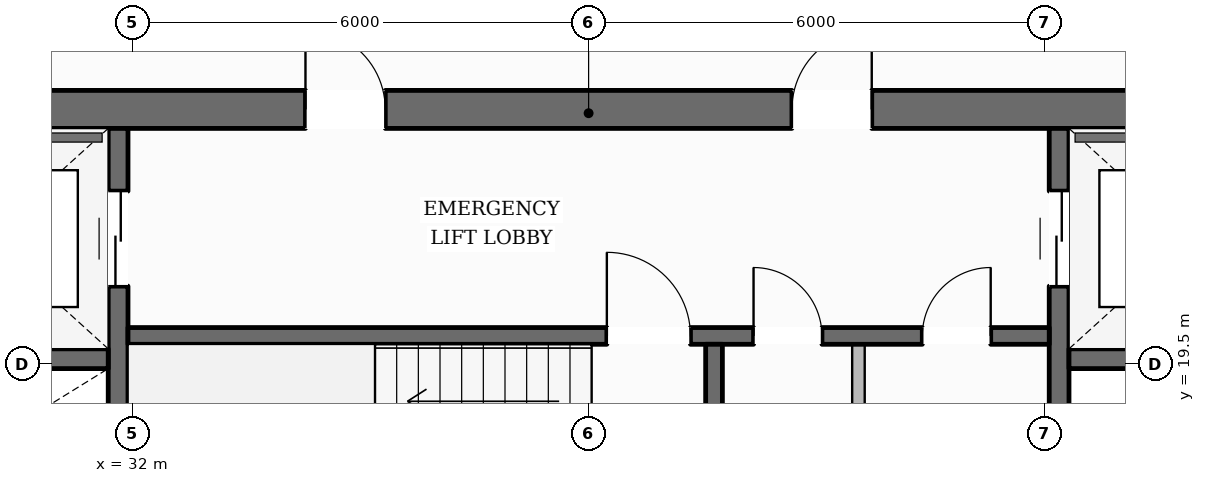
"""IFC4 building model, lengths in metres.
Left out: names, types, materials, properties, quantities, classifications, styles, units other than length and angle.
Written with IfcOpenShell. Run it as: python <this file> out.ifc"""

import sys

from ifc_helpers import new_model, si_unit, direction, frame, frame_2d, origin, place, context, subcontext, project, spatial, rectangle, extrude, element, fill, save


model = new_model("IFC4")
c1 = context("Model", 3, precision=1e-05, world=origin(), true_north=direction((0.0, 1.0)))
c2 = subcontext(c1, "Body", "Model", "MODEL_VIEW")
j1 = project(units=[si_unit("LENGTHUNIT", "METRE"), si_unit("PLANEANGLEUNIT", "RADIAN")], contexts=[c1])
p1 = place(None, origin())
s1 = spatial("IfcSite", under=j1, at=p1, CompositionType="ELEMENT")
p2 = place(p1, origin())
s2 = spatial("IfcBuilding", under=s1, at=p2, CompositionType="ELEMENT")
p3 = place(p2, frame((0.0, 0.0, 104.75)))
s3 = spatial("IfcBuildingStorey", under=s2, at=p3, CompositionType="ELEMENT", Elevation=104.75)
p4 = place(p3, frame((27.98, 22.85, 0.0), z_axis=(0.0, 0.0, 1.0), x_axis=(1.0, 0.0, 0.0)))
e1 = element("IfcWall", 1, at=p4, inside=s3, PredefinedType="SOLIDWALL", context=c2, shape_type="SweptSolid", body=[
    extrude(rectangle(XDim=20.04, YDim=0.5, at=frame_2d((10.02, 0.0))), origin(), (0.0, 0.0, 1.0), 3.6),
])
p5 = place(p4, frame((6.295, 0.0, 0.0)))
e2 = element("IfcOpeningElement", 2, at=p5, cuts=e1, PredefinedType="OPENING", context=c2, shape_type="SweptSolid", body=[
    extrude(rectangle(XDim=1.05, YDim=2.15, at=frame_2d((0.525, 1.075))), frame((0.0, 0.26, 0.0), z_axis=(0.0, -1.0, 0.0), x_axis=(1.0, 0.0, 0.0)), (0.0, 0.0, 1.0), 0.52),
])
p6 = place(p4, frame((12.695, 0.0, 0.0)))
e3 = element("IfcOpeningElement", 3, at=p6, cuts=e1, PredefinedType="OPENING", context=c2, shape_type="SweptSolid", body=[
    extrude(rectangle(XDim=1.05, YDim=2.15, at=frame_2d((0.525, 1.075))), frame((0.0, 0.26, 0.0), z_axis=(0.0, -1.0, 0.0), x_axis=(1.0, 0.0, 0.0)), (0.0, 0.0, 1.0), 0.52),
])
p7 = place(p3, frame((31.81, 9.6, 0.0), z_axis=(0.0, 0.0, 1.0), x_axis=(0.0, 1.0, 0.0)))
e4 = element("IfcWall", 4, at=p7, inside=s3, PredefinedType="SHEAR", context=c2, shape_type="SweptSolid", body=[
    extrude(rectangle(XDim=13.0, YDim=0.26, at=frame_2d((6.5, 0.0))), origin(), (0.0, 0.0, 1.0), 3.6),
])
p8 = place(p7, frame((10.925, 0.0, 0.0)))
e5 = element("IfcOpeningElement", 5, at=p8, cuts=e4, PredefinedType="OPENING", context=c2, shape_type="SweptSolid", body=[
    extrude(rectangle(XDim=1.25, YDim=2.25, at=frame_2d((0.625, 1.125))), frame((0.0, 0.14, 0.0), z_axis=(0.0, -1.0, 0.0), x_axis=(1.0, 0.0, 0.0)), (0.0, 0.0, 1.0), 0.28),
])
p9 = place(p3, frame((44.19, 9.6, 0.0), z_axis=(0.0, 0.0, 1.0), x_axis=(0.0, 1.0, 0.0)))
e6 = element("IfcWall", 6, at=p9, inside=s3, PredefinedType="SHEAR", context=c2, shape_type="SweptSolid", body=[
    extrude(rectangle(XDim=13.0, YDim=0.26, at=frame_2d((6.5, 0.0))), origin(), (0.0, 0.0, 1.0), 3.6),
])
p10 = place(p9, frame((10.925, 0.0, 0.0)))
e7 = element("IfcOpeningElement", 7, at=p10, cuts=e6, PredefinedType="OPENING", context=c2, shape_type="SweptSolid", body=[
    extrude(rectangle(XDim=1.25, YDim=2.25, at=frame_2d((0.625, 1.125))), frame((0.0, 0.14, 0.0), z_axis=(0.0, -1.0, 0.0), x_axis=(1.0, 0.0, 0.0)), (0.0, 0.0, 1.0), 0.28),
])
for number, where, z_axis, x_axis in (
    (8, (28.48, 19.57, 0.0), (0.0, 0.0, 1.0), (1.0, 0.0, 0.0)),
    (9, (44.32, 19.57, 0.0), (0.0, 0.0, 1.0), (1.0, 0.0, 0.0)),
):
    element("IfcWall", number, at=place(p3, frame(where, z_axis=z_axis, x_axis=x_axis)), inside=s3, PredefinedType="SHEAR", context=c2, shape_type="SweptSolid", body=[
        extrude(rectangle(XDim=3.2, YDim=0.26, at=frame_2d((1.6, 0.0))), origin(), (0.0, 0.0, 1.0), 3.6),
    ])
p11 = place(p3, frame((31.94, 19.87, 0.0), z_axis=(0.0, 0.0, 1.0), x_axis=(1.0, 0.0, 0.0)))
e10 = element("IfcWall", 10, at=p11, inside=s3, PredefinedType="SOLIDWALL", context=c2, shape_type="SweptSolid", body=[
    extrude(rectangle(XDim=12.12, YDim=0.22, at=frame_2d((6.06, 0.0))), origin(), (0.0, 0.0, 1.0), 3.6),
])
p12 = place(p11, frame((6.3, 0.0, 0.0)))
e11 = element("IfcOpeningElement", 11, at=p12, cuts=e10, PredefinedType="OPENING", context=c2, shape_type="SweptSolid", body=[
    extrude(rectangle(XDim=1.1, YDim=2.15, at=frame_2d((0.55, 1.075))), frame((0.0, 0.12, 0.0), z_axis=(0.0, -1.0, 0.0), x_axis=(1.0, 0.0, 0.0)), (0.0, 0.0, 1.0), 0.24),
])
p13 = place(p11, frame((8.23, 0.0, 0.0)))
e12 = element("IfcOpeningElement", 12, at=p13, cuts=e10, PredefinedType="OPENING", context=c2, shape_type="SweptSolid", body=[
    extrude(rectangle(XDim=0.9, YDim=2.1, at=frame_2d((0.45, 1.05))), frame((0.0, 0.12, 0.0), z_axis=(0.0, -1.0, 0.0), x_axis=(1.0, 0.0, 0.0)), (0.0, 0.0, 1.0), 0.24),
])
p14 = place(p11, frame((10.45, 0.0, 0.0)))
e13 = element("IfcOpeningElement", 13, at=p14, cuts=e10, PredefinedType="OPENING", context=c2, shape_type="SweptSolid", body=[
    extrude(rectangle(XDim=0.9, YDim=2.1, at=frame_2d((0.45, 1.05))), frame((0.0, 0.12, 0.0), z_axis=(0.0, -1.0, 0.0), x_axis=(1.0, 0.0, 0.0)), (0.0, 0.0, 1.0), 0.24),
])
p15 = place(p3, frame((39.65, 16.56, 0.0), z_axis=(0.0, 0.0, 1.0), x_axis=(0.0, 1.0, 0.0)))
e14 = element("IfcWall", 14, at=p15, inside=s3, PredefinedType="SOLIDWALL", context=c2, shape_type="SweptSolid", body=[
    extrude(rectangle(XDim=3.2, YDim=0.22, at=frame_2d((1.6, 0.0))), origin(), (0.0, 0.0, 1.0), 3.6),
])
p16 = place(p3, frame((14.155, 13.347, 0.0), z_axis=(0.0, 0.0, 1.0), x_axis=(0.493868426836, 0.869536644986, 0.0)))
e15 = element("IfcWall", 15, at=p16, inside=s3, PredefinedType="STANDARD", context=c2, shape_type="SweptSolid", body=[
    extrude(rectangle(XDim=36.121, YDim=0.38, at=frame_2d((18.061, 0.0))), origin(), (0.0, 0.0, 1.0), 3.059),
])
p17 = place(p16, frame((31.935, 0.0, 0.65)))
e16 = element("IfcOpeningElement", 16, at=p17, cuts=e15, PredefinedType="OPENING", context=c2, shape_type="SweptSolid", body=[
    extrude(rectangle(XDim=1.55, YDim=1.75, at=frame_2d((0.775, 0.875))), frame((0.0, 0.2, 0.0), z_axis=(0.0, -1.0, 0.0), x_axis=(1.0, 0.0, 0.0)), (0.0, 0.0, 1.0), 0.4),
])
p18 = place(p16, frame((26.073, 0.0, 0.65)))
e17 = element("IfcOpeningElement", 17, at=p18, cuts=e15, PredefinedType="OPENING", context=c2, shape_type="SweptSolid", body=[
    extrude(rectangle(XDim=1.55, YDim=1.75, at=frame_2d((0.775, 0.875))), frame((0.0, 0.2, 0.0), z_axis=(0.0, -1.0, 0.0), x_axis=(1.0, 0.0, 0.0)), (0.0, 0.0, 1.0), 0.4),
])
p19 = place(p16, frame((14.352, 0.0, 0.65)))
e18 = element("IfcOpeningElement", 18, at=p19, cuts=e15, PredefinedType="OPENING", context=c2, shape_type="SweptSolid", body=[
    extrude(rectangle(XDim=1.55, YDim=1.75, at=frame_2d((0.775, 0.875))), frame((0.0, 0.2, 0.0), z_axis=(0.0, -1.0, 0.0), x_axis=(1.0, 0.0, 0.0)), (0.0, 0.0, 1.0), 0.4),
])
p20 = place(p16, frame((8.491, 0.0, 0.65)))
e19 = element("IfcOpeningElement", 19, at=p20, cuts=e15, PredefinedType="OPENING", context=c2, shape_type="SweptSolid", body=[
    extrude(rectangle(XDim=1.55, YDim=1.75, at=frame_2d((0.775, 0.875))), frame((0.0, 0.2, 0.0), z_axis=(0.0, -1.0, 0.0), x_axis=(1.0, 0.0, 0.0)), (0.0, 0.0, 1.0), 0.4),
])
p21 = place(p16, frame((2.63, 0.0, 0.65)))
e20 = element("IfcOpeningElement", 20, at=p21, cuts=e15, PredefinedType="OPENING", context=c2, shape_type="SweptSolid", body=[
    extrude(rectangle(XDim=1.55, YDim=1.75, at=frame_2d((0.775, 0.875))), frame((0.0, 0.2, 0.0), z_axis=(0.0, -1.0, 0.0), x_axis=(1.0, 0.0, 0.0)), (0.0, 0.0, 1.0), 0.4),
])
p22 = place(p3, frame((44.12, 44.689, 0.0), z_axis=(0.0, 0.0, 1.0), x_axis=(0.498376840975, -0.866960509124, 0.0)))
e21 = element("IfcWall", 21, at=p22, inside=s3, PredefinedType="STANDARD", context=c2, shape_type="SweptSolid", body=[
    extrude(rectangle(XDim=36.441, YDim=0.38, at=frame_2d((18.22, 0.0))), origin(), (0.0, 0.0, 1.0), 3.059),
])
p23 = place(p22, frame((32.234, 0.0, 0.65)))
e22 = element("IfcOpeningElement", 22, at=p23, cuts=e21, PredefinedType="OPENING", context=c2, shape_type="SweptSolid", body=[
    extrude(rectangle(XDim=1.55, YDim=1.75, at=frame_2d((0.775, 0.875))), frame((0.0, 0.2, 0.0), z_axis=(0.0, -1.0, 0.0), x_axis=(1.0, 0.0, 0.0)), (0.0, 0.0, 1.0), 0.4),
])
p24 = place(p22, frame((26.319, 0.0, 0.65)))
e23 = element("IfcOpeningElement", 23, at=p24, cuts=e21, PredefinedType="OPENING", context=c2, shape_type="SweptSolid", body=[
    extrude(rectangle(XDim=1.55, YDim=1.75, at=frame_2d((0.775, 0.875))), frame((0.0, 0.2, 0.0), z_axis=(0.0, -1.0, 0.0), x_axis=(1.0, 0.0, 0.0)), (0.0, 0.0, 1.0), 0.4),
])
p25 = place(p22, frame((14.489, 0.0, 0.65)))
e24 = element("IfcOpeningElement", 24, at=p25, cuts=e21, PredefinedType="OPENING", context=c2, shape_type="SweptSolid", body=[
    extrude(rectangle(XDim=1.55, YDim=1.75, at=frame_2d((0.775, 0.875))), frame((0.0, 0.2, 0.0), z_axis=(0.0, -1.0, 0.0), x_axis=(1.0, 0.0, 0.0)), (0.0, 0.0, 1.0), 0.4),
])
p26 = place(p22, frame((8.573, 0.0, 0.65)))
e25 = element("IfcOpeningElement", 25, at=p26, cuts=e21, PredefinedType="OPENING", context=c2, shape_type="SweptSolid", body=[
    extrude(rectangle(XDim=1.55, YDim=1.75, at=frame_2d((0.775, 0.875))), frame((0.0, 0.2, 0.0), z_axis=(0.0, -1.0, 0.0), x_axis=(1.0, 0.0, 0.0)), (0.0, 0.0, 1.0), 0.4),
])
p27 = place(p22, frame((2.658, 0.0, 0.65)))
e26 = element("IfcOpeningElement", 26, at=p27, cuts=e21, PredefinedType="OPENING", context=c2, shape_type="SweptSolid", body=[
    extrude(rectangle(XDim=1.55, YDim=1.75, at=frame_2d((0.775, 0.875))), frame((0.0, 0.2, 0.0), z_axis=(0.0, -1.0, 0.0), x_axis=(1.0, 0.0, 0.0)), (0.0, 0.0, 1.0), 0.4),
])
p28 = place(p3, frame((41.55, 16.56, 0.0), z_axis=(0.0, 0.0, 1.0), x_axis=(0.0, 1.0, 0.0)))
e27 = element("IfcWall", 27, at=p28, inside=s3, PredefinedType="PARTITIONING", context=c2, shape_type="SweptSolid", body=[
    extrude(rectangle(XDim=3.2, YDim=0.165, at=frame_2d((1.6, 0.0))), origin(), (0.0, 0.0, 1.0), 3.6),
])
p29 = place(p12, origin())
e28 = element("IfcDoor", 28, at=p29, inside=s3, OperationType="SINGLE_SWING_LEFT", PredefinedType="DOOR", context=c2, shape_type="SweptSolid", body=[
    extrude(rectangle(XDim=1.1, YDim=2.15, at=frame_2d((0.55, 1.075))), frame((0.0, 0.025, 0.0), z_axis=(0.0, -1.0, 0.0), x_axis=(1.0, 0.0, 0.0)), (0.0, 0.0, 1.0), 0.05),
])
fill(e11, e28)
p30 = place(p5, origin())
e29 = element("IfcDoor", 29, at=p30, inside=s3, OperationType="SINGLE_SWING_LEFT", PredefinedType="DOOR", context=c2, shape_type="SweptSolid", body=[
    extrude(rectangle(XDim=1.05, YDim=2.15, at=frame_2d((0.525, 1.075))), frame((0.0, 0.025, 0.0), z_axis=(0.0, -1.0, 0.0), x_axis=(1.0, 0.0, 0.0)), (0.0, 0.0, 1.0), 0.05),
])
fill(e2, e29)
p31 = place(p6, origin())
e30 = element("IfcDoor", 30, at=p31, inside=s3, OperationType="SINGLE_SWING_RIGHT", PredefinedType="DOOR", context=c2, shape_type="SweptSolid", body=[
    extrude(rectangle(XDim=1.05, YDim=2.15, at=frame_2d((0.525, 1.075))), frame((0.0, 0.025, 0.0), z_axis=(0.0, -1.0, 0.0), x_axis=(1.0, 0.0, 0.0)), (0.0, 0.0, 1.0), 0.05),
])
fill(e3, e30)
p32 = place(p8, origin())
e31 = element("IfcDoor", 31, at=p32, inside=s3, OperationType="DOUBLE_DOOR_SLIDING", PredefinedType="DOOR", context=c2, shape_type="SweptSolid", body=[
    extrude(rectangle(XDim=1.25, YDim=2.25, at=frame_2d((0.625, 1.125))), frame((0.0, 0.025, 0.0), z_axis=(0.0, -1.0, 0.0), x_axis=(1.0, 0.0, 0.0)), (0.0, 0.0, 1.0), 0.05),
])
fill(e5, e31)
p33 = place(p10, origin())
e32 = element("IfcDoor", 32, at=p33, inside=s3, OperationType="DOUBLE_DOOR_SLIDING", PredefinedType="DOOR", context=c2, shape_type="SweptSolid", body=[
    extrude(rectangle(XDim=1.25, YDim=2.25, at=frame_2d((0.625, 1.125))), frame((0.0, 0.025, 0.0), z_axis=(0.0, -1.0, 0.0), x_axis=(1.0, 0.0, 0.0)), (0.0, 0.0, 1.0), 0.05),
])
fill(e7, e32)
p34 = place(p13, origin())
e33 = element("IfcDoor", 33, at=p34, inside=s3, OperationType="SINGLE_SWING_LEFT", PredefinedType="DOOR", context=c2, shape_type="SweptSolid", body=[
    extrude(rectangle(XDim=0.9, YDim=2.1, at=frame_2d((0.45, 1.05))), frame((0.0, 0.025, 0.0), z_axis=(0.0, -1.0, 0.0), x_axis=(1.0, 0.0, 0.0)), (0.0, 0.0, 1.0), 0.05),
])
fill(e12, e33)
p35 = place(p14, origin())
e34 = element("IfcDoor", 34, at=p35, inside=s3, OperationType="SINGLE_SWING_RIGHT", PredefinedType="DOOR", context=c2, shape_type="SweptSolid", body=[
    extrude(rectangle(XDim=0.9, YDim=2.1, at=frame_2d((0.45, 1.05))), frame((0.0, 0.025, 0.0), z_axis=(0.0, -1.0, 0.0), x_axis=(1.0, 0.0, 0.0)), (0.0, 0.0, 1.0), 0.05),
])
fill(e13, e34)
save(model, sys.argv[1])
